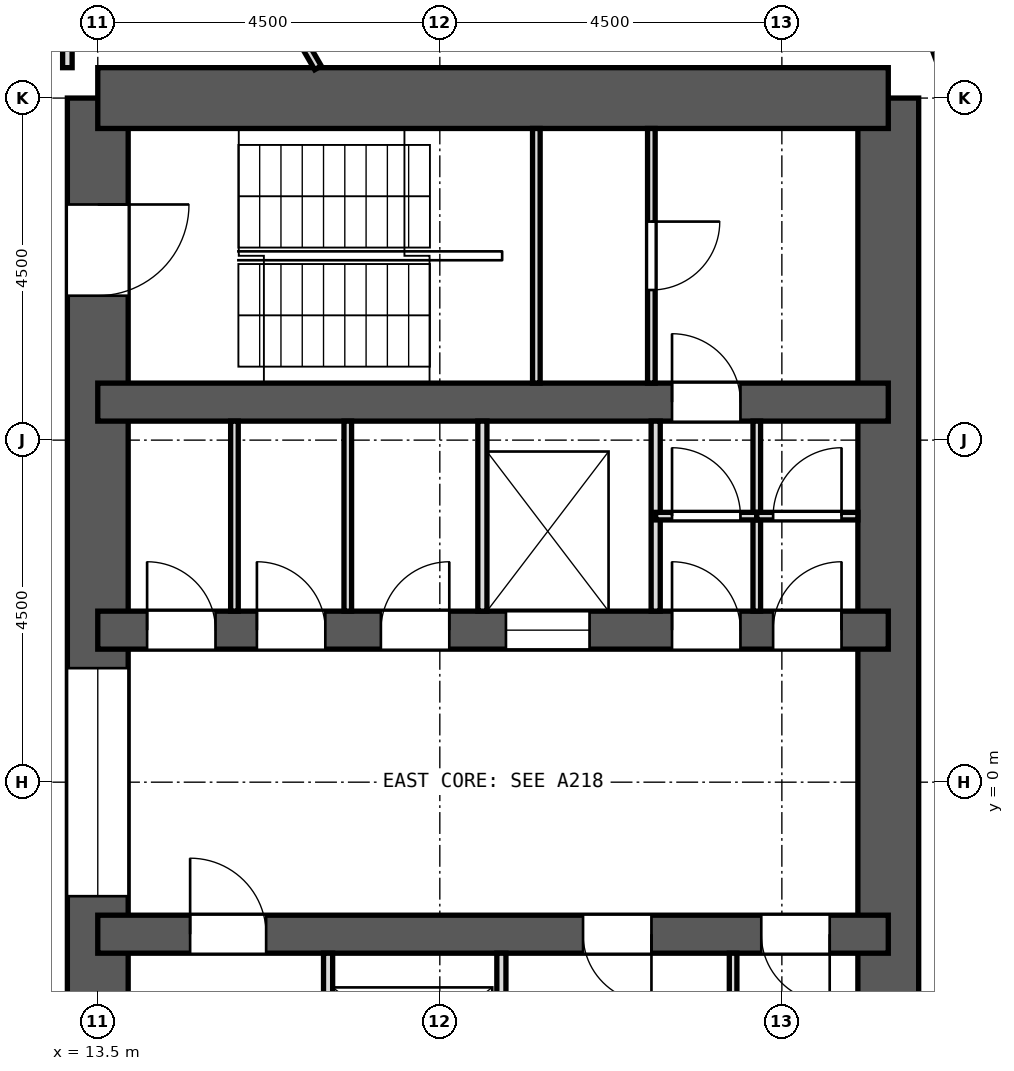
"""IFC4 building model, lengths in metres.
Left out: names, types, materials, properties, quantities, classifications, styles, units other than length and angle.
Written with IfcOpenShell. Run it as: python <this file> out.ifc"""

import sys

from ifc_helpers import new_model, si_unit, direction, frame, frame_2d, origin, place, context, subcontext, project, spatial, rectangle, extrude, element, fill, save


model = new_model("IFC4")
c1 = context("Model", 3, precision=1e-05, world=origin(), true_north=direction((0.0, 1.0)))
c2 = subcontext(c1, "Body", "Model", "MODEL_VIEW")
j1 = project(units=[si_unit("LENGTHUNIT", "METRE"), si_unit("PLANEANGLEUNIT", "RADIAN")], contexts=[c1])
p1 = place(None, origin())
s1 = spatial("IfcSite", under=j1, at=p1, CompositionType="ELEMENT")
p2 = place(p1, origin())
s2 = spatial("IfcBuilding", under=s1, at=p2, CompositionType="ELEMENT")
p3 = place(p2, frame((0.0, 0.0, 101.8)))
s3 = spatial("IfcBuildingStorey", under=s2, at=p3, CompositionType="ELEMENT", Elevation=101.8)
p4 = place(p3, frame((13.5, -9.0, 0.0), z_axis=(0.0, 0.0, 1.0), x_axis=(0.0, 1.0, 0.0)))
e1 = element("IfcWall", 1, at=p4, inside=s3, PredefinedType="SHEAR", context=c2, shape_type="SweptSolid", body=[
    extrude(rectangle(XDim=18.0, YDim=0.8, at=frame_2d((9.0, 0.0))), origin(), (0.0, 0.0, 1.0), 3.3),
])
p5 = place(p4, frame((15.4, 0.0, 0.0)))
e2 = element("IfcOpeningElement", 2, at=p5, cuts=e1, PredefinedType="OPENING", context=c2, shape_type="SweptSolid", body=[
    extrude(rectangle(XDim=1.2, YDim=2.1, at=frame_2d((0.6, 1.05))), frame((0.0, 0.412, 0.0), z_axis=(0.0, -1.0, 0.0), x_axis=(1.0, 0.0, 0.0)), (0.0, 0.0, 1.0), 0.824),
])
p6 = place(p4, frame((1.4, 0.0, 0.0)))
e3 = element("IfcOpeningElement", 3, at=p6, cuts=e1, PredefinedType="OPENING", context=c2, shape_type="SweptSolid", body=[
    extrude(rectangle(XDim=1.2, YDim=2.1, at=frame_2d((0.6, 1.05))), frame((0.0, 0.412, 0.0), z_axis=(0.0, -1.0, 0.0), x_axis=(1.0, 0.0, 0.0)), (0.0, 0.0, 1.0), 0.824),
])
p7 = place(p4, frame((7.5, 0.0, 0.0)))
e4 = element("IfcOpeningElement", 4, at=p7, cuts=e1, PredefinedType="OPENING", context=c2, shape_type="SweptSolid", body=[
    extrude(rectangle(XDim=3.0, YDim=2.4, at=frame_2d((1.5, 1.2))), frame((0.0, 0.412, 0.0), z_axis=(0.0, -1.0, 0.0), x_axis=(1.0, 0.0, 0.0)), (0.0, 0.0, 1.0), 0.824),
])
p8 = place(p3, frame((23.9, -9.0, 0.0), z_axis=(0.0, 0.0, 1.0), x_axis=(0.0, 1.0, 0.0)))
e5 = element("IfcWall", 5, at=p8, inside=s3, PredefinedType="SHEAR", context=c2, shape_type="SweptSolid", body=[
    extrude(rectangle(XDim=18.0, YDim=0.8, at=frame_2d((9.0, 0.0))), origin(), (0.0, 0.0, 1.0), 3.3),
])
p9 = place(p3, frame((13.5, 9.0, 0.0), z_axis=(0.0, 0.0, 1.0), x_axis=(1.0, 0.0, 0.0)))
e6 = element("IfcWall", 6, at=p9, inside=s3, PredefinedType="SHEAR", context=c2, shape_type="SweptSolid", body=[
    extrude(rectangle(XDim=10.4, YDim=0.8, at=frame_2d((5.2, 0.0))), origin(), (0.0, 0.0, 1.0), 3.3),
])
p10 = place(p3, frame((13.5, 5.0, 0.0), z_axis=(0.0, 0.0, 1.0), x_axis=(1.0, 0.0, 0.0)))
e7 = element("IfcWall", 7, at=p10, inside=s3, PredefinedType="SHEAR", context=c2, shape_type="SweptSolid", body=[
    extrude(rectangle(XDim=10.4, YDim=0.5, at=frame_2d((5.2, 0.0))), origin(), (0.0, 0.0, 1.0), 3.3),
])
p11 = place(p10, frame((7.555, 0.0, 0.0)))
e8 = element("IfcOpeningElement", 8, at=p11, cuts=e7, PredefinedType="OPENING", context=c2, shape_type="SweptSolid", body=[
    extrude(rectangle(XDim=0.9, YDim=2.1, at=frame_2d((0.45, 1.05))), frame((0.0, 0.262, 0.0), z_axis=(0.0, -1.0, 0.0), x_axis=(1.0, 0.0, 0.0)), (0.0, 0.0, 1.0), 0.524),
])
p12 = place(p3, frame((13.5, 2.0, 0.0), z_axis=(0.0, 0.0, 1.0), x_axis=(1.0, 0.0, 0.0)))
e9 = element("IfcWall", 9, at=p12, inside=s3, PredefinedType="SHEAR", context=c2, shape_type="SweptSolid", body=[
    extrude(rectangle(XDim=10.4, YDim=0.5, at=frame_2d((5.2, 0.0))), origin(), (0.0, 0.0, 1.0), 3.3),
])
p13 = place(p12, frame((5.37, 0.0, 0.0)))
e10 = element("IfcOpeningElement", 10, at=p13, cuts=e9, PredefinedType="OPENING", context=c2, shape_type="SweptSolid", body=[
    extrude(rectangle(XDim=1.1, YDim=2.1, at=frame_2d((0.55, 1.05))), frame((0.0, 0.262, 0.0), z_axis=(0.0, -1.0, 0.0), x_axis=(1.0, 0.0, 0.0)), (0.0, 0.0, 1.0), 0.524),
])
p14 = place(p12, frame((0.649, 0.0, 0.0)))
e11 = element("IfcOpeningElement", 11, at=p14, cuts=e9, PredefinedType="OPENING", context=c2, shape_type="SweptSolid", body=[
    extrude(rectangle(XDim=0.9, YDim=2.1, at=frame_2d((0.45, 1.05))), frame((0.0, 0.262, 0.0), z_axis=(0.0, -1.0, 0.0), x_axis=(1.0, 0.0, 0.0)), (0.0, 0.0, 1.0), 0.524),
])
p15 = place(p12, frame((2.094, 0.0, 0.0)))
e12 = element("IfcOpeningElement", 12, at=p15, cuts=e9, PredefinedType="OPENING", context=c2, shape_type="SweptSolid", body=[
    extrude(rectangle(XDim=0.9, YDim=2.1, at=frame_2d((0.45, 1.05))), frame((0.0, 0.262, 0.0), z_axis=(0.0, -1.0, 0.0), x_axis=(1.0, 0.0, 0.0)), (0.0, 0.0, 1.0), 0.524),
])
p16 = place(p12, frame((3.725, 0.0, 0.0)))
e13 = element("IfcOpeningElement", 13, at=p16, cuts=e9, PredefinedType="OPENING", context=c2, shape_type="SweptSolid", body=[
    extrude(rectangle(XDim=0.9, YDim=2.1, at=frame_2d((0.45, 1.05))), frame((0.0, 0.262, 0.0), z_axis=(0.0, -1.0, 0.0), x_axis=(1.0, 0.0, 0.0)), (0.0, 0.0, 1.0), 0.524),
])
p17 = place(p12, frame((7.555, 0.0, 0.0)))
e14 = element("IfcOpeningElement", 14, at=p17, cuts=e9, PredefinedType="OPENING", context=c2, shape_type="SweptSolid", body=[
    extrude(rectangle(XDim=0.9, YDim=2.1, at=frame_2d((0.45, 1.05))), frame((0.0, 0.262, 0.0), z_axis=(0.0, -1.0, 0.0), x_axis=(1.0, 0.0, 0.0)), (0.0, 0.0, 1.0), 0.524),
])
p18 = place(p12, frame((8.885, 0.0, 0.0)))
e15 = element("IfcOpeningElement", 15, at=p18, cuts=e9, PredefinedType="OPENING", context=c2, shape_type="SweptSolid", body=[
    extrude(rectangle(XDim=0.9, YDim=2.1, at=frame_2d((0.45, 1.05))), frame((0.0, 0.262, 0.0), z_axis=(0.0, -1.0, 0.0), x_axis=(1.0, 0.0, 0.0)), (0.0, 0.0, 1.0), 0.524),
])
p19 = place(p3, frame((13.5, -2.0, 0.0), z_axis=(0.0, 0.0, 1.0), x_axis=(1.0, 0.0, 0.0)))
e16 = element("IfcWall", 16, at=p19, inside=s3, PredefinedType="SHEAR", context=c2, shape_type="SweptSolid", body=[
    extrude(rectangle(XDim=10.4, YDim=0.5, at=frame_2d((5.2, 0.0))), origin(), (0.0, 0.0, 1.0), 3.3),
])
p20 = place(p19, frame((1.215, 0.0, 0.0)))
e17 = element("IfcOpeningElement", 17, at=p20, cuts=e16, PredefinedType="OPENING", context=c2, shape_type="SweptSolid", body=[
    extrude(rectangle(XDim=1.0, YDim=2.1, at=frame_2d((0.5, 1.05))), frame((0.0, 0.262, 0.0), z_axis=(0.0, -1.0, 0.0), x_axis=(1.0, 0.0, 0.0)), (0.0, 0.0, 1.0), 0.524),
])
p21 = place(p19, frame((6.384, 0.0, 0.0)))
e18 = element("IfcOpeningElement", 18, at=p21, cuts=e16, PredefinedType="OPENING", context=c2, shape_type="SweptSolid", body=[
    extrude(rectangle(XDim=0.9, YDim=2.1, at=frame_2d((0.45, 1.05))), frame((0.0, 0.262, 0.0), z_axis=(0.0, -1.0, 0.0), x_axis=(1.0, 0.0, 0.0)), (0.0, 0.0, 1.0), 0.524),
])
p22 = place(p19, frame((8.729, 0.0, 0.0)))
e19 = element("IfcOpeningElement", 19, at=p22, cuts=e16, PredefinedType="OPENING", context=c2, shape_type="SweptSolid", body=[
    extrude(rectangle(XDim=0.9, YDim=2.1, at=frame_2d((0.45, 1.05))), frame((0.0, 0.262, 0.0), z_axis=(0.0, -1.0, 0.0), x_axis=(1.0, 0.0, 0.0)), (0.0, 0.0, 1.0), 0.524),
])
p23 = place(p3, frame((25.617, 7.383, 0.0), z_axis=(0.0, 0.0, 1.0), x_axis=(-0.341990236633, 0.939703505393, 0.0)))
e20 = element("IfcWall", 20, at=p23, inside=s3, PredefinedType="SOLIDWALL", context=c2, shape_type="SweptSolid", body=[
    extrude(rectangle(XDim=3.648, YDim=0.6, at=frame_2d((1.824, 0.0))), origin(), (0.0, 0.0, 1.0), 2.8),
])
p24 = place(p3, frame((15.515, 10.925, 0.0), z_axis=(0.0, 0.0, 1.0), x_axis=(0.500277597875, -0.865865073245, 0.0)))
e21 = element("IfcWall", 21, at=p24, inside=s3, PredefinedType="PARTITIONING", context=c2, shape_type="SweptSolid", body=[
    extrude(rectangle(XDim=1.764, YDim=0.1, at=frame_2d((0.882, 0.0))), origin(), (0.0, 0.0, 1.0), 2.8),
])
p25 = place(p3, frame((8.136, 8.136, 0.0), z_axis=(0.0, 0.0, 1.0), x_axis=(0.707106781187, 0.707106781187, 0.0)))
e22 = element("IfcWall", 22, at=p25, inside=s3, PredefinedType="PARTITIONING", context=c2, shape_type="SweptSolid", body=[
    extrude(rectangle(XDim=7.415, YDim=0.125, at=frame_2d((3.708, 0.0))), origin(), (0.0, 0.0, 1.0), 2.8),
])
p26 = place(p3, frame((13.1, 9.4, 0.0), z_axis=(0.0, 0.0, 1.0), x_axis=(0.0, 1.0, 0.0)))
e23 = element("IfcWall", 23, at=p26, inside=s3, PredefinedType="PARTITIONING", context=c2, shape_type="SweptSolid", body=[
    extrude(rectangle(XDim=3.638, YDim=0.125, at=frame_2d((1.819, 0.0))), origin(), (0.0, 0.0, 1.0), 2.8),
])
for number, where, z_axis, x_axis in (
    (24, (15.298, 2.25, 0.0), (0.0, 0.0, 1.0), (0.0, 1.0, 0.0)),
    (25, (16.789, 2.25, 0.0), (0.0, 0.0, 1.0), (0.0, 1.0, 0.0)),
):
    element("IfcWall", number, at=place(p3, frame(where, z_axis=z_axis, x_axis=x_axis)), inside=s3, PredefinedType="PARTITIONING", context=c2, shape_type="SweptSolid", body=[
        extrude(rectangle(XDim=2.5, YDim=0.1, at=frame_2d((1.25, 0.0))), origin(), (0.0, 0.0, 1.0), 2.8),
    ])
for number, where, z_axis, x_axis in (
    (26, (18.56, 2.25, 0.0), (0.0, 0.0, 1.0), (0.0, 1.0, 0.0)),
    (27, (20.84, 2.25, 0.0), (0.0, 0.0, 1.0), (0.0, 1.0, 0.0)),
):
    element("IfcWall", number, at=place(p3, frame(where, z_axis=z_axis, x_axis=x_axis)), inside=s3, PredefinedType="PARTITIONING", context=c2, shape_type="SweptSolid", body=[
        extrude(rectangle(XDim=2.5, YDim=0.12, at=frame_2d((1.25, 0.0))), origin(), (0.0, 0.0, 1.0), 2.8),
    ])
p27 = place(p3, frame((22.17, 2.25, 0.0), z_axis=(0.0, 0.0, 1.0), x_axis=(0.0, 1.0, 0.0)))
e28 = element("IfcWall", 28, at=p27, inside=s3, PredefinedType="PARTITIONING", context=c2, shape_type="SweptSolid", body=[
    extrude(rectangle(XDim=2.5, YDim=0.1, at=frame_2d((1.25, 0.0))), origin(), (0.0, 0.0, 1.0), 2.8),
])
p28 = place(p3, frame((16.53, -4.75, 0.0), z_axis=(0.0, 0.0, 1.0), x_axis=(0.0, 1.0, 0.0)))
e29 = element("IfcWall", 29, at=p28, inside=s3, PredefinedType="PARTITIONING", context=c2, shape_type="SweptSolid", body=[
    extrude(rectangle(XDim=2.5, YDim=0.12, at=frame_2d((1.25, 0.0))), origin(), (0.0, 0.0, 1.0), 2.8),
])
p29 = place(p28, frame((0.7, 0.0, 0.0)))
e30 = element("IfcOpeningElement", 30, at=p29, cuts=e29, PredefinedType="OPENING", context=c2, shape_type="SweptSolid", body=[
    extrude(rectangle(XDim=1.1, YDim=2.1, at=frame_2d((0.55, 1.05))), frame((0.0, 0.072, 0.0), z_axis=(0.0, -1.0, 0.0), x_axis=(1.0, 0.0, 0.0)), (0.0, 0.0, 1.0), 0.144),
])
p30 = place(p3, frame((18.81, -4.75, 0.0), z_axis=(0.0, 0.0, 1.0), x_axis=(0.0, 1.0, 0.0)))
e31 = element("IfcWall", 31, at=p30, inside=s3, PredefinedType="PARTITIONING", context=c2, shape_type="SweptSolid", body=[
    extrude(rectangle(XDim=2.5, YDim=0.12, at=frame_2d((1.25, 0.0))), origin(), (0.0, 0.0, 1.0), 2.8),
])
p31 = place(p3, frame((21.858, -4.75, 0.0), z_axis=(0.0, 0.0, 1.0), x_axis=(0.0, 1.0, 0.0)))
e32 = element("IfcWall", 32, at=p31, inside=s3, PredefinedType="PARTITIONING", context=c2, shape_type="SweptSolid", body=[
    extrude(rectangle(XDim=2.5, YDim=0.1, at=frame_2d((1.25, 0.0))), origin(), (0.0, 0.0, 1.0), 2.8),
])
p32 = place(p3, frame((20.84, 3.5, 0.0), z_axis=(0.0, 0.0, 1.0), x_axis=(1.0, 0.0, 0.0)))
e33 = element("IfcWall", 33, at=p32, inside=s3, PredefinedType="PARTITIONING", context=c2, shape_type="SweptSolid", body=[
    extrude(rectangle(XDim=1.33, YDim=0.1, at=frame_2d((0.665, 0.0))), origin(), (0.0, 0.0, 1.0), 2.8),
])
p33 = place(p32, frame((0.215, 0.0, 0.0)))
e34 = element("IfcOpeningElement", 34, at=p33, cuts=e33, PredefinedType="OPENING", context=c2, shape_type="SweptSolid", body=[
    extrude(rectangle(XDim=0.9, YDim=2.1, at=frame_2d((0.45, 1.05))), frame((0.0, 0.062, 0.0), z_axis=(0.0, -1.0, 0.0), x_axis=(1.0, 0.0, 0.0)), (0.0, 0.0, 1.0), 0.124),
])
p34 = place(p3, frame((22.17, 3.5, 0.0), z_axis=(0.0, 0.0, 1.0), x_axis=(1.0, 0.0, 0.0)))
e35 = element("IfcWall", 35, at=p34, inside=s3, PredefinedType="PARTITIONING", context=c2, shape_type="SweptSolid", body=[
    extrude(rectangle(XDim=1.33, YDim=0.1, at=frame_2d((0.665, 0.0))), origin(), (0.0, 0.0, 1.0), 2.8),
])
p35 = place(p34, frame((0.215, 0.0, 0.0)))
e36 = element("IfcOpeningElement", 36, at=p35, cuts=e35, PredefinedType="OPENING", context=c2, shape_type="SweptSolid", body=[
    extrude(rectangle(XDim=0.9, YDim=2.1, at=frame_2d((0.45, 1.05))), frame((0.0, 0.062, 0.0), z_axis=(0.0, -1.0, 0.0), x_axis=(1.0, 0.0, 0.0)), (0.0, 0.0, 1.0), 0.124),
])
p36 = place(p3, frame((19.27, 5.25, 0.0), z_axis=(0.0, 0.0, 1.0), x_axis=(0.0, 1.0, 0.0)))
e37 = element("IfcWall", 37, at=p36, inside=s3, PredefinedType="PARTITIONING", context=c2, shape_type="SweptSolid", body=[
    extrude(rectangle(XDim=3.35, YDim=0.1, at=frame_2d((1.675, 0.0))), origin(), (0.0, 0.0, 1.0), 2.8),
])
p37 = place(p3, frame((20.783, 5.25, 0.0), z_axis=(0.0, 0.0, 1.0), x_axis=(0.0, 1.0, 0.0)))
e38 = element("IfcWall", 38, at=p37, inside=s3, PredefinedType="PARTITIONING", context=c2, shape_type="SweptSolid", body=[
    extrude(rectangle(XDim=3.35, YDim=0.1, at=frame_2d((1.675, 0.0))), origin(), (0.0, 0.0, 1.0), 2.8),
])
p38 = place(p37, frame((1.225, 0.0, 0.0)))
e39 = element("IfcOpeningElement", 39, at=p38, cuts=e38, PredefinedType="OPENING", context=c2, shape_type="SweptSolid", body=[
    extrude(rectangle(XDim=0.9, YDim=2.1, at=frame_2d((0.45, 1.05))), frame((0.0, 0.062, 0.0), z_axis=(0.0, -1.0, 0.0), x_axis=(1.0, 0.0, 0.0)), (0.0, 0.0, 1.0), 0.124),
])
p39 = place(p13, origin())
e40 = element("IfcDoor", 40, at=p39, inside=s3, OperationType="DOUBLE_DOOR_SLIDING", PredefinedType="DOOR", context=c2, shape_type="SweptSolid", body=[
    extrude(rectangle(XDim=1.1, YDim=2.1, at=frame_2d((0.55, 1.05))), frame((0.0, 0.025, 0.0), z_axis=(0.0, -1.0, 0.0), x_axis=(1.0, 0.0, 0.0)), (0.0, 0.0, 1.0), 0.05),
])
fill(e10, e40)
p40 = place(p14, origin())
e41 = element("IfcDoor", 41, at=p40, inside=s3, OperationType="SINGLE_SWING_LEFT", PredefinedType="DOOR", context=c2, shape_type="SweptSolid", body=[
    extrude(rectangle(XDim=0.9, YDim=2.1, at=frame_2d((0.45, 1.05))), frame((0.0, 0.025, 0.0), z_axis=(0.0, -1.0, 0.0), x_axis=(1.0, 0.0, 0.0)), (0.0, 0.0, 1.0), 0.05),
])
fill(e11, e41)
p41 = place(p15, origin())
e42 = element("IfcDoor", 42, at=p41, inside=s3, OperationType="SINGLE_SWING_LEFT", PredefinedType="DOOR", context=c2, shape_type="SweptSolid", body=[
    extrude(rectangle(XDim=0.9, YDim=2.1, at=frame_2d((0.45, 1.05))), frame((0.0, 0.025, 0.0), z_axis=(0.0, -1.0, 0.0), x_axis=(1.0, 0.0, 0.0)), (0.0, 0.0, 1.0), 0.05),
])
fill(e12, e42)
p42 = place(p16, origin())
e43 = element("IfcDoor", 43, at=p42, inside=s3, OperationType="SINGLE_SWING_RIGHT", PredefinedType="DOOR", context=c2, shape_type="SweptSolid", body=[
    extrude(rectangle(XDim=0.9, YDim=2.1, at=frame_2d((0.45, 1.05))), frame((0.0, 0.025, 0.0), z_axis=(0.0, -1.0, 0.0), x_axis=(1.0, 0.0, 0.0)), (0.0, 0.0, 1.0), 0.05),
])
fill(e13, e43)
p43 = place(p17, origin())
e44 = element("IfcDoor", 44, at=p43, inside=s3, OperationType="SINGLE_SWING_LEFT", PredefinedType="DOOR", context=c2, shape_type="SweptSolid", body=[
    extrude(rectangle(XDim=0.9, YDim=2.1, at=frame_2d((0.45, 1.05))), frame((0.0, 0.025, 0.0), z_axis=(0.0, -1.0, 0.0), x_axis=(1.0, 0.0, 0.0)), (0.0, 0.0, 1.0), 0.05),
])
fill(e14, e44)
p44 = place(p18, origin())
e45 = element("IfcDoor", 45, at=p44, inside=s3, OperationType="SINGLE_SWING_RIGHT", PredefinedType="DOOR", context=c2, shape_type="SweptSolid", body=[
    extrude(rectangle(XDim=0.9, YDim=2.1, at=frame_2d((0.45, 1.05))), frame((0.0, 0.025, 0.0), z_axis=(0.0, -1.0, 0.0), x_axis=(1.0, 0.0, 0.0)), (0.0, 0.0, 1.0), 0.05),
])
fill(e15, e45)
p45 = place(p20, origin())
e46 = element("IfcDoor", 46, at=p45, inside=s3, OperationType="SINGLE_SWING_LEFT", PredefinedType="DOOR", context=c2, shape_type="SweptSolid", body=[
    extrude(rectangle(XDim=1.0, YDim=2.1, at=frame_2d((0.5, 1.05))), frame((0.0, 0.025, 0.0), z_axis=(0.0, -1.0, 0.0), x_axis=(1.0, 0.0, 0.0)), (0.0, 0.0, 1.0), 0.05),
])
fill(e17, e46)
p46 = place(p21, frame((0.9, 0.0, 0.0), z_axis=(0.0, 0.0, 1.0), x_axis=(-1.0, 0.0, 0.0)))
e47 = element("IfcDoor", 47, at=p46, inside=s3, OperationType="SINGLE_SWING_LEFT", PredefinedType="DOOR", context=c2, shape_type="SweptSolid", body=[
    extrude(rectangle(XDim=0.9, YDim=2.1, at=frame_2d((0.45, 1.05))), frame((0.0, 0.025, 0.0), z_axis=(0.0, -1.0, 0.0), x_axis=(1.0, 0.0, 0.0)), (0.0, 0.0, 1.0), 0.05),
])
fill(e18, e47)
p47 = place(p22, frame((0.9, 0.0, 0.0), z_axis=(0.0, 0.0, 1.0), x_axis=(-1.0, 0.0, 0.0)))
e48 = element("IfcDoor", 48, at=p47, inside=s3, OperationType="SINGLE_SWING_LEFT", PredefinedType="DOOR", context=c2, shape_type="SweptSolid", body=[
    extrude(rectangle(XDim=0.9, YDim=2.1, at=frame_2d((0.45, 1.05))), frame((0.0, 0.025, 0.0), z_axis=(0.0, -1.0, 0.0), x_axis=(1.0, 0.0, 0.0)), (0.0, 0.0, 1.0), 0.05),
])
fill(e19, e48)
p48 = place(p35, origin())
e49 = element("IfcDoor", 49, at=p48, inside=s3, OperationType="SINGLE_SWING_RIGHT", PredefinedType="DOOR", context=c2, shape_type="SweptSolid", body=[
    extrude(rectangle(XDim=0.9, YDim=2.1, at=frame_2d((0.45, 1.05))), frame((0.0, 0.025, 0.0), z_axis=(0.0, -1.0, 0.0), x_axis=(1.0, 0.0, 0.0)), (0.0, 0.0, 1.0), 0.05),
])
fill(e36, e49)
p49 = place(p33, origin())
e50 = element("IfcDoor", 50, at=p49, inside=s3, OperationType="SINGLE_SWING_LEFT", PredefinedType="DOOR", context=c2, shape_type="SweptSolid", body=[
    extrude(rectangle(XDim=0.9, YDim=2.1, at=frame_2d((0.45, 1.05))), frame((0.0, 0.025, 0.0), z_axis=(0.0, -1.0, 0.0), x_axis=(1.0, 0.0, 0.0)), (0.0, 0.0, 1.0), 0.05),
])
fill(e34, e50)
p50 = place(p38, frame((0.9, 0.0, 0.0), z_axis=(0.0, 0.0, 1.0), x_axis=(-1.0, 0.0, 0.0)))
e51 = element("IfcDoor", 51, at=p50, inside=s3, OperationType="SINGLE_SWING_LEFT", PredefinedType="DOOR", context=c2, shape_type="SweptSolid", body=[
    extrude(rectangle(XDim=0.9, YDim=2.1, at=frame_2d((0.45, 1.05))), frame((0.0, 0.025, 0.0), z_axis=(0.0, -1.0, 0.0), x_axis=(1.0, 0.0, 0.0)), (0.0, 0.0, 1.0), 0.05),
])
fill(e39, e51)
p51 = place(p11, origin())
e52 = element("IfcDoor", 52, at=p51, inside=s3, OperationType="SINGLE_SWING_LEFT", PredefinedType="DOOR", context=c2, shape_type="SweptSolid", body=[
    extrude(rectangle(XDim=0.9, YDim=2.1, at=frame_2d((0.45, 1.05))), frame((0.0, 0.025, 0.0), z_axis=(0.0, -1.0, 0.0), x_axis=(1.0, 0.0, 0.0)), (0.0, 0.0, 1.0), 0.05),
])
fill(e8, e52)
p52 = place(p5, frame((1.2, 0.0, 0.0), z_axis=(0.0, 0.0, 1.0), x_axis=(-1.0, 0.0, 0.0)))
e53 = element("IfcDoor", 53, at=p52, inside=s3, OperationType="SINGLE_SWING_LEFT", PredefinedType="DOOR", context=c2, shape_type="SweptSolid", body=[
    extrude(rectangle(XDim=1.2, YDim=2.1, at=frame_2d((0.6, 1.05))), frame((0.0, 0.025, 0.0), z_axis=(0.0, -1.0, 0.0), x_axis=(1.0, 0.0, 0.0)), (0.0, 0.0, 1.0), 0.05),
])
fill(e2, e53)
p53 = place(p7, origin())
e54 = element("IfcDoor", 54, at=p53, inside=s3, OperationType="DOUBLE_DOOR_SLIDING", PredefinedType="DOOR", context=c2, shape_type="SweptSolid", body=[
    extrude(rectangle(XDim=3.0, YDim=2.4, at=frame_2d((1.5, 1.2))), frame((0.0, 0.025, 0.0), z_axis=(0.0, -1.0, 0.0), x_axis=(1.0, 0.0, 0.0)), (0.0, 0.0, 1.0), 0.05),
])
fill(e4, e54)
save(model, sys.argv[1])
